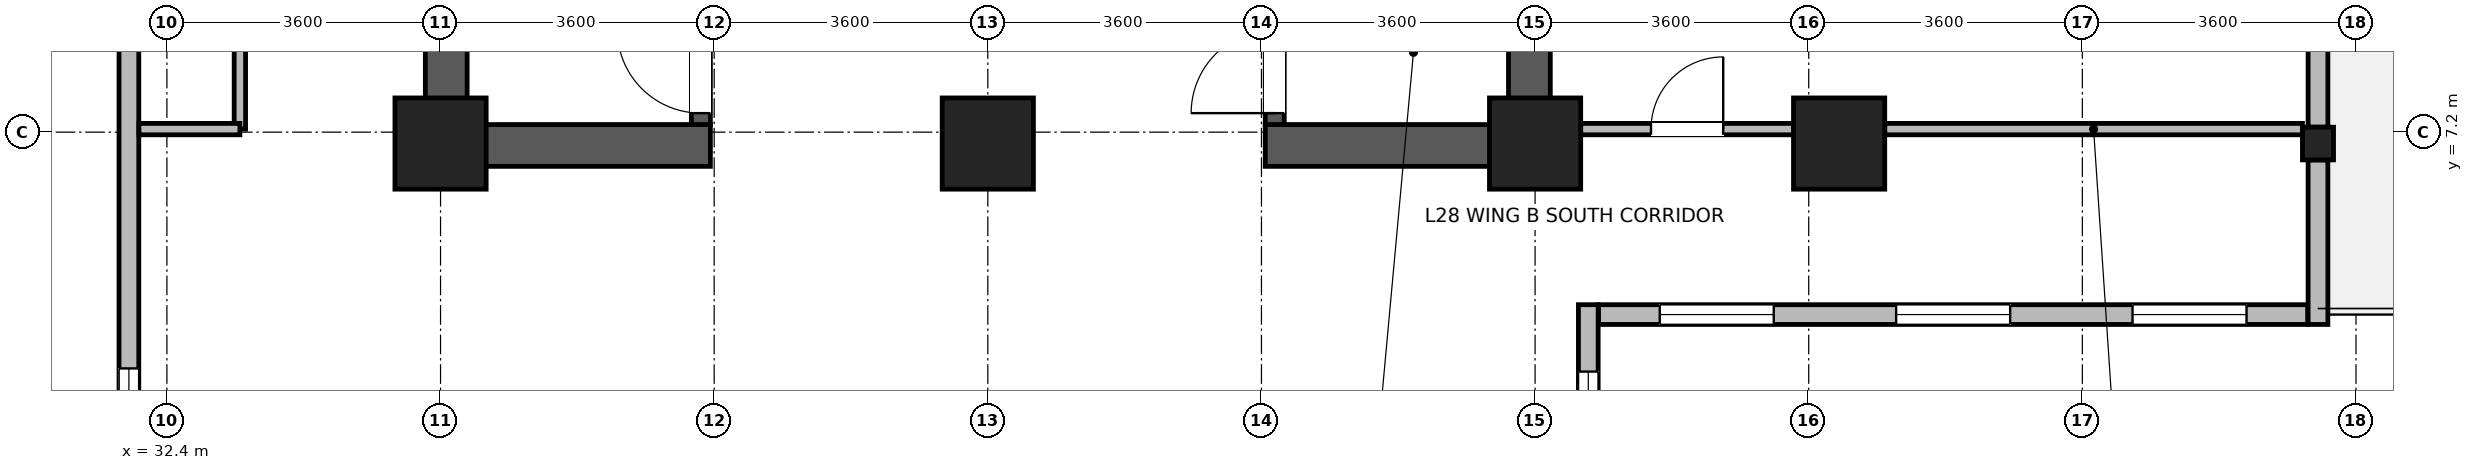
"""IFC4 building model, lengths in metres.
Left out: names, types, materials, properties, quantities, classifications, styles, units other than length and angle.
Written with IfcOpenShell. Run it as: python <this file> out.ifc"""

import sys

from ifc_helpers import new_model, si_unit, direction, frame, frame_2d, origin, origin_2d, place, context, subcontext, project, spatial, rectangle, i_section, extrude, source, transform, mapped, element, fill, save


model = new_model("IFC4")
c1 = context("Model", 3, precision=1e-05, world=origin(), true_north=direction((0.0, 1.0)))
c2 = subcontext(c1, "Body", "Model", "MODEL_VIEW")
j1 = project(units=[si_unit("LENGTHUNIT", "METRE"), si_unit("PLANEANGLEUNIT", "RADIAN")], contexts=[c1])
p1 = place(None, origin())
s1 = spatial("IfcSite", under=j1, at=p1, CompositionType="ELEMENT")
p2 = place(p1, origin())
s2 = spatial("IfcBuilding", under=s1, at=p2, CompositionType="ELEMENT")
p3 = place(p2, frame((0.0, 0.0, 111.9)))
s3 = spatial("IfcBuildingStorey", under=s2, at=p3, CompositionType="ELEMENT", Elevation=111.9)
for number, where, z_axis, x_axis in (
    (1, (36.075, 6.75, 0.0), (0.0, 0.0, 1.0), (0.0, 1.0, 0.0)),
    (2, (50.325, 6.75, 0.0), (0.0, 0.0, 1.0), (0.0, 1.0, 0.0)),
):
    element("IfcWall", number, at=place(p3, frame(where, z_axis=z_axis, x_axis=x_axis)), inside=s3, PredefinedType="SHEAR", context=c2, shape_type="SweptSolid", body=[
        extrude(rectangle(XDim=8.1, YDim=0.55, at=frame_2d((4.05, 0.0))), origin(), (0.0, 0.0, 1.0), 3.45),
    ])
for number, where, z_axis, x_axis in (
    (3, (36.35, 7.025, 0.0), (0.0, 0.0, 1.0), (1.0, 0.0, 0.0)),
    (4, (46.85, 7.025, 0.0), (0.0, 0.0, 1.0), (1.0, 0.0, 0.0)),
):
    element("IfcWall", number, at=place(p3, frame(where, z_axis=z_axis, x_axis=x_axis)), inside=s3, PredefinedType="SHEAR", context=c2, shape_type="SweptSolid", body=[
        extrude(rectangle(XDim=3.2, YDim=0.55, at=frame_2d((1.6, 0.0))), origin(), (0.0, 0.0, 1.0), 3.45),
    ])
p4 = place(p3, frame((39.425, 7.3, 0.0), z_axis=(0.0, 0.0, 1.0), x_axis=(0.0, 1.0, 0.0)))
e5 = element("IfcWall", 5, at=p4, inside=s3, PredefinedType="SHEAR", context=c2, shape_type="SweptSolid", body=[
    extrude(rectangle(XDim=7.0, YDim=0.25, at=frame_2d((3.5, 0.0))), origin(), (0.0, 0.0, 1.0), 3.45),
])
p5 = place(p4, frame((0.15, 0.0, 0.0)))
e6 = element("IfcOpeningElement", 6, at=p5, cuts=e5, PredefinedType="OPENING", context=c2, shape_type="SweptSolid", body=[
    extrude(rectangle(XDim=1.1, YDim=2.08, at=frame_2d((0.55, 1.04))), frame((0.0, 0.135, 0.0), z_axis=(0.0, -1.0, 0.0), x_axis=(1.0, 0.0, 0.0)), (0.0, 0.0, 1.0), 0.27),
])
p6 = place(p3, frame((46.975, 7.3, 0.0), z_axis=(0.0, 0.0, 1.0), x_axis=(0.0, 1.0, 0.0)))
e7 = element("IfcWall", 7, at=p6, inside=s3, PredefinedType="SHEAR", context=c2, shape_type="SweptSolid", body=[
    extrude(rectangle(XDim=7.0, YDim=0.25, at=frame_2d((3.5, 0.0))), origin(), (0.0, 0.0, 1.0), 3.45),
])
p7 = place(p6, frame((0.15, 0.0, 0.0)))
e8 = element("IfcOpeningElement", 8, at=p7, cuts=e7, PredefinedType="OPENING", context=c2, shape_type="SweptSolid", body=[
    extrude(rectangle(XDim=1.1, YDim=2.08, at=frame_2d((0.55, 1.04))), frame((0.0, 0.135, 0.0), z_axis=(0.0, -1.0, 0.0), x_axis=(1.0, 0.0, 0.0)), (0.0, 0.0, 1.0), 0.27),
])
m1 = source(origin(), c2, "Body", "SweptSolid", [
    extrude(rectangle(XDim=1.2, YDim=1.2, at=origin_2d()), origin(), (0.0, 0.0, 1.0), 3.7),
])
for number, where, z_axis, x_axis in (
    (9, (36.0, 7.05, 0.0), (0.0, 0.0, 1.0), (1.0, 0.0, 0.0)),
    (10, (43.2, 7.05, 0.0), (0.0, 0.0, 1.0), (1.0, 0.0, 0.0)),
    (11, (50.4, 7.05, 0.0), (0.0, 0.0, 1.0), (1.0, 0.0, 0.0)),
    (12, (54.4, 7.05, 0.0), (0.0, 0.0, 1.0), (1.0, 0.0, 0.0)),
):
    element("IfcColumn", number, at=place(p3, frame(where, z_axis=z_axis, x_axis=x_axis)), inside=s3, PredefinedType="COLUMN", context=c2, shape_type="MappedRepresentation", body=[
        mapped(m1, transform((0.0, 0.0, 0.0), x_axis=(1.0, 0.0, 0.0), y_axis=(0.0, 1.0, 0.0), z_axis=(0.0, 0.0, 1.0), scale=1.0)),
    ])
m2 = source(origin(), c2, "Body", "SweptSolid", [
    extrude(i_section(OverallWidth=0.409, OverallDepth=0.43, WebThickness=0.024, FlangeThickness=0.033, FilletRadius=0.015, at=origin_2d()), origin(), (0.0, 0.0, 1.0), 3.7),
])
p8 = place(p3, frame((60.7, 7.05, 0.0), z_axis=(0.0, 0.0, 1.0), x_axis=(1.0, 0.0, 0.0)))
e13 = element("IfcColumn", 13, at=p8, inside=s3, PredefinedType="COLUMN", context=c2, shape_type="MappedRepresentation", body=[
    mapped(m2, transform((0.0, 0.0, 0.0), x_axis=(1.0, 0.0, 0.0), y_axis=(0.0, 1.0, 0.0), z_axis=(0.0, 0.0, 1.0), scale=1.0)),
])
p9 = place(p3, frame((51.1, 4.93, 0.0), z_axis=(0.0, 0.0, 1.0), x_axis=(0.0, -1.0, 0.0)))
e14 = element("IfcWall", 14, at=p9, inside=s3, PredefinedType="STANDARD", context=c2, shape_type="SweptSolid", body=[
    extrude(rectangle(XDim=3.26, YDim=0.26, at=frame_2d((1.63, 0.0))), origin(), (0.0, 0.0, 1.0), 3.43),
])
p10 = place(p9, frame((0.88, 0.0, 0.85)))
e15 = element("IfcOpeningElement", 15, at=p10, cuts=e14, PredefinedType="OPENING", context=c2, shape_type="SweptSolid", body=[
    extrude(rectangle(XDim=1.5, YDim=1.85, at=frame_2d((0.75, 0.925))), frame((0.0, 0.14, 0.0), z_axis=(0.0, -1.0, 0.0), x_axis=(1.0, 0.0, 0.0)), (0.0, 0.0, 1.0), 0.28),
])
p11 = place(p3, frame((60.565, 4.8, 0.0), z_axis=(0.0, 0.0, 1.0), x_axis=(-1.0, 0.0, 0.0)))
e16 = element("IfcWall", 16, at=p11, inside=s3, PredefinedType="STANDARD", context=c2, shape_type="SweptSolid", body=[
    extrude(rectangle(XDim=9.33, YDim=0.26, at=frame_2d((4.665, 0.0))), origin(), (0.0, 0.0, 1.0), 3.43),
])
p12 = place(p11, frame((0.805, 0.0, 0.85)))
e17 = element("IfcOpeningElement", 17, at=p12, cuts=e16, PredefinedType="OPENING", context=c2, shape_type="SweptSolid", body=[
    extrude(rectangle(XDim=1.5, YDim=1.85, at=frame_2d((0.75, 0.925))), frame((0.0, 0.14, 0.0), z_axis=(0.0, -1.0, 0.0), x_axis=(1.0, 0.0, 0.0)), (0.0, 0.0, 1.0), 0.28),
])
p13 = place(p11, frame((3.915, 0.0, 0.85)))
e18 = element("IfcOpeningElement", 18, at=p13, cuts=e16, PredefinedType="OPENING", context=c2, shape_type="SweptSolid", body=[
    extrude(rectangle(XDim=1.5, YDim=1.85, at=frame_2d((0.75, 0.925))), frame((0.0, 0.14, 0.0), z_axis=(0.0, -1.0, 0.0), x_axis=(1.0, 0.0, 0.0)), (0.0, 0.0, 1.0), 0.28),
])
p14 = place(p11, frame((7.025, 0.0, 0.85)))
e19 = element("IfcOpeningElement", 19, at=p14, cuts=e16, PredefinedType="OPENING", context=c2, shape_type="SweptSolid", body=[
    extrude(rectangle(XDim=1.5, YDim=1.85, at=frame_2d((0.75, 0.925))), frame((0.0, 0.14, 0.0), z_axis=(0.0, -1.0, 0.0), x_axis=(1.0, 0.0, 0.0)), (0.0, 0.0, 1.0), 0.28),
])
p15 = place(p3, frame((60.7, 6.834, 0.0), z_axis=(0.0, 0.0, 1.0), x_axis=(0.0, -1.0, 0.0)))
e20 = element("IfcWall", 20, at=p15, inside=s3, PredefinedType="STANDARD", context=c2, shape_type="SweptSolid", body=[
    extrude(rectangle(XDim=2.164, YDim=0.26, at=frame_2d((1.082, 0.0))), origin(), (0.0, 0.0, 1.0), 3.43),
])
p16 = place(p3, frame((60.7, 14.334, 0.0), z_axis=(0.0, 0.0, 1.0), x_axis=(0.0, -1.0, 0.0)))
e21 = element("IfcWall", 21, at=p16, inside=s3, PredefinedType="STANDARD", context=c2, shape_type="SweptSolid", body=[
    extrude(rectangle(XDim=7.068, YDim=0.26, at=frame_2d((3.534, 0.0))), origin(), (0.0, 0.0, 1.0), 2.98),
])
p17 = place(p16, frame((2.784, 0.0, 0.0)))
e22 = element("IfcOpeningElement", 22, at=p17, cuts=e21, PredefinedType="OPENING", context=c2, shape_type="SweptSolid", body=[
    extrude(rectangle(XDim=1.5, YDim=2.15, at=frame_2d((0.75, 1.075))), frame((0.0, 0.14, 0.0), z_axis=(0.0, -1.0, 0.0), x_axis=(1.0, 0.0, 0.0)), (0.0, 0.0, 1.0), 0.28),
])
p18 = place(p16, frame((1.017, 0.0, 0.85)))
e23 = element("IfcOpeningElement", 23, at=p18, cuts=e21, PredefinedType="OPENING", context=c2, shape_type="SweptSolid", body=[
    extrude(rectangle(XDim=1.5, YDim=1.85, at=frame_2d((0.75, 0.925))), frame((0.0, 0.14, 0.0), z_axis=(0.0, -1.0, 0.0), x_axis=(1.0, 0.0, 0.0)), (0.0, 0.0, 1.0), 0.28),
])
p19 = place(p16, frame((4.551, 0.0, 0.85)))
e24 = element("IfcOpeningElement", 24, at=p19, cuts=e21, PredefinedType="OPENING", context=c2, shape_type="SweptSolid", body=[
    extrude(rectangle(XDim=1.5, YDim=1.85, at=frame_2d((0.75, 0.925))), frame((0.0, 0.14, 0.0), z_axis=(0.0, -1.0, 0.0), x_axis=(1.0, 0.0, 0.0)), (0.0, 0.0, 1.0), 0.28),
])
p20 = place(p3, frame((31.9, 1.67, 0.0), z_axis=(0.0, 0.0, 1.0), x_axis=(0.0, 1.0, 0.0)))
e25 = element("IfcWall", 25, at=p20, inside=s3, PredefinedType="STANDARD", context=c2, shape_type="SweptSolid", body=[
    extrude(rectangle(XDim=20.06, YDim=0.26, at=frame_2d((10.03, 0.0))), origin(), (0.0, 0.0, 1.0), 3.43),
])
p21 = place(p20, frame((0.922, 0.0, 0.85)))
e26 = element("IfcOpeningElement", 26, at=p21, cuts=e25, PredefinedType="OPENING", context=c2, shape_type="SweptSolid", body=[
    extrude(rectangle(XDim=1.5, YDim=1.85, at=frame_2d((0.75, 0.925))), frame((0.0, 0.14, 0.0), z_axis=(0.0, -1.0, 0.0), x_axis=(1.0, 0.0, 0.0)), (0.0, 0.0, 1.0), 0.28),
])
p22 = place(p20, frame((7.608, 0.0, 0.85)))
e27 = element("IfcOpeningElement", 27, at=p22, cuts=e25, PredefinedType="OPENING", context=c2, shape_type="SweptSolid", body=[
    extrude(rectangle(XDim=1.5, YDim=1.85, at=frame_2d((0.75, 0.925))), frame((0.0, 0.14, 0.0), z_axis=(0.0, -1.0, 0.0), x_axis=(1.0, 0.0, 0.0)), (0.0, 0.0, 1.0), 0.28),
])
p23 = place(p20, frame((10.952, 0.0, 0.85)))
e28 = element("IfcOpeningElement", 28, at=p23, cuts=e25, PredefinedType="OPENING", context=c2, shape_type="SweptSolid", body=[
    extrude(rectangle(XDim=1.5, YDim=1.85, at=frame_2d((0.75, 0.925))), frame((0.0, 0.14, 0.0), z_axis=(0.0, -1.0, 0.0), x_axis=(1.0, 0.0, 0.0)), (0.0, 0.0, 1.0), 0.28),
])
p24 = place(p20, frame((14.295, 0.0, 0.85)))
e29 = element("IfcOpeningElement", 29, at=p24, cuts=e25, PredefinedType="OPENING", context=c2, shape_type="SweptSolid", body=[
    extrude(rectangle(XDim=1.5, YDim=1.85, at=frame_2d((0.75, 0.925))), frame((0.0, 0.14, 0.0), z_axis=(0.0, -1.0, 0.0), x_axis=(1.0, 0.0, 0.0)), (0.0, 0.0, 1.0), 0.28),
])
p25 = place(p20, frame((17.638, 0.0, 0.85)))
e30 = element("IfcOpeningElement", 30, at=p25, cuts=e25, PredefinedType="OPENING", context=c2, shape_type="SweptSolid", body=[
    extrude(rectangle(XDim=1.5, YDim=1.85, at=frame_2d((0.75, 0.925))), frame((0.0, 0.14, 0.0), z_axis=(0.0, -1.0, 0.0), x_axis=(1.0, 0.0, 0.0)), (0.0, 0.0, 1.0), 0.28),
])
p26 = place(p3, frame((51.0, 7.24, 0.0), z_axis=(0.0, 0.0, 1.0), x_axis=(1.0, 0.0, 0.0)))
e31 = element("IfcWall", 31, at=p26, inside=s3, PredefinedType="PARTITIONING", context=c2, shape_type="SweptSolid", body=[
    extrude(rectangle(XDim=2.8, YDim=0.15, at=frame_2d((1.4, 0.0))), origin(), (0.0, 0.0, 1.0), 2.78),
])
p27 = place(p26, frame((0.925, 0.0, 0.0)))
e32 = element("IfcOpeningElement", 32, at=p27, cuts=e31, PredefinedType="OPENING", context=c2, shape_type="SweptSolid", body=[
    extrude(rectangle(XDim=0.95, YDim=2.1, at=frame_2d((0.475, 1.05))), frame((0.0, 0.085, 0.0), z_axis=(0.0, -1.0, 0.0), x_axis=(1.0, 0.0, 0.0)), (0.0, 0.0, 1.0), 0.17),
])
p28 = place(p3, frame((55.0, 7.24, 0.0), z_axis=(0.0, 0.0, 1.0), x_axis=(1.0, 0.0, 0.0)))
e33 = element("IfcWall", 33, at=p28, inside=s3, PredefinedType="PARTITIONING", context=c2, shape_type="SweptSolid", body=[
    extrude(rectangle(XDim=5.496, YDim=0.15, at=frame_2d((2.748, 0.0))), origin(), (0.0, 0.0, 1.0), 2.78),
])
p29 = place(p3, frame((33.36, 7.24, 0.0), z_axis=(0.0, 0.0, 1.0), x_axis=(0.0, 1.0, 0.0)))
e34 = element("IfcWall", 34, at=p29, inside=s3, PredefinedType="PARTITIONING", context=c2, shape_type="SweptSolid", body=[
    extrude(rectangle(XDim=7.26, YDim=0.15, at=frame_2d((3.63, 0.0))), origin(), (0.0, 0.0, 1.0), 3.43),
])
p30 = place(p29, frame((2.98, 0.0, 0.0)))
e35 = element("IfcOpeningElement", 35, at=p30, cuts=e34, PredefinedType="OPENING", context=c2, shape_type="SweptSolid", body=[
    extrude(rectangle(XDim=1.3, YDim=2.12, at=frame_2d((0.65, 1.06))), frame((0.0, 0.085, 0.0), z_axis=(0.0, -1.0, 0.0), x_axis=(1.0, 0.0, 0.0)), (0.0, 0.0, 1.0), 0.17),
])
p31 = place(p3, frame((32.032, 7.24, 0.0), z_axis=(0.0, 0.0, 1.0), x_axis=(1.0, 0.0, 0.0)))
e36 = element("IfcWall", 36, at=p31, inside=s3, PredefinedType="PARTITIONING", context=c2, shape_type="SweptSolid", body=[
    extrude(rectangle(XDim=1.328, YDim=0.15, at=frame_2d((0.664, 0.0))), origin(), (0.0, 0.0, 1.0), 3.43),
])
p32 = place(p10, origin())
e37 = element("IfcWindow", 37, at=p32, inside=s3, PartitioningType="SINGLE_PANEL", PredefinedType="WINDOW", context=c2, shape_type="SweptSolid", body=[
    extrude(rectangle(XDim=1.5, YDim=1.85, at=frame_2d((0.75, 0.925))), frame((0.0, 0.03, 0.0), z_axis=(0.0, -1.0, 0.0), x_axis=(1.0, 0.0, 0.0)), (0.0, 0.0, 1.0), 0.06),
])
fill(e15, e37)
p33 = place(p12, origin())
e38 = element("IfcWindow", 38, at=p33, inside=s3, PartitioningType="SINGLE_PANEL", PredefinedType="WINDOW", context=c2, shape_type="SweptSolid", body=[
    extrude(rectangle(XDim=1.5, YDim=1.85, at=frame_2d((0.75, 0.925))), frame((0.0, 0.03, 0.0), z_axis=(0.0, -1.0, 0.0), x_axis=(1.0, 0.0, 0.0)), (0.0, 0.0, 1.0), 0.06),
])
fill(e17, e38)
p34 = place(p13, origin())
e39 = element("IfcWindow", 39, at=p34, inside=s3, PartitioningType="SINGLE_PANEL", PredefinedType="WINDOW", context=c2, shape_type="SweptSolid", body=[
    extrude(rectangle(XDim=1.5, YDim=1.85, at=frame_2d((0.75, 0.925))), frame((0.0, 0.03, 0.0), z_axis=(0.0, -1.0, 0.0), x_axis=(1.0, 0.0, 0.0)), (0.0, 0.0, 1.0), 0.06),
])
fill(e18, e39)
p35 = place(p14, origin())
e40 = element("IfcWindow", 40, at=p35, inside=s3, PartitioningType="SINGLE_PANEL", PredefinedType="WINDOW", context=c2, shape_type="SweptSolid", body=[
    extrude(rectangle(XDim=1.5, YDim=1.85, at=frame_2d((0.75, 0.925))), frame((0.0, 0.03, 0.0), z_axis=(0.0, -1.0, 0.0), x_axis=(1.0, 0.0, 0.0)), (0.0, 0.0, 1.0), 0.06),
])
fill(e19, e40)
p36 = place(p21, origin())
e41 = element("IfcWindow", 41, at=p36, inside=s3, PartitioningType="SINGLE_PANEL", PredefinedType="WINDOW", context=c2, shape_type="SweptSolid", body=[
    extrude(rectangle(XDim=1.5, YDim=1.85, at=frame_2d((0.75, 0.925))), frame((0.0, 0.03, 0.0), z_axis=(0.0, -1.0, 0.0), x_axis=(1.0, 0.0, 0.0)), (0.0, 0.0, 1.0), 0.06),
])
fill(e26, e41)
p37 = place(p5, origin())
e42 = element("IfcDoor", 42, at=p37, inside=s3, OperationType="SINGLE_SWING_RIGHT", PredefinedType="DOOR", context=c2, shape_type="SweptSolid", body=[
    extrude(rectangle(XDim=1.1, YDim=2.08, at=frame_2d((0.55, 1.04))), frame((0.0, 0.025, 0.0), z_axis=(0.0, -1.0, 0.0), x_axis=(1.0, 0.0, 0.0)), (0.0, 0.0, 1.0), 0.05),
])
fill(e6, e42)
p38 = place(p7, origin())
e43 = element("IfcDoor", 43, at=p38, inside=s3, OperationType="SINGLE_SWING_LEFT", PredefinedType="DOOR", context=c2, shape_type="SweptSolid", body=[
    extrude(rectangle(XDim=1.1, YDim=2.08, at=frame_2d((0.55, 1.04))), frame((0.0, 0.025, 0.0), z_axis=(0.0, -1.0, 0.0), x_axis=(1.0, 0.0, 0.0)), (0.0, 0.0, 1.0), 0.05),
])
fill(e8, e43)
p39 = place(p27, origin())
e44 = element("IfcDoor", 44, at=p39, inside=s3, OperationType="SINGLE_SWING_RIGHT", PredefinedType="DOOR", context=c2, shape_type="SweptSolid", body=[
    extrude(rectangle(XDim=0.95, YDim=2.1, at=frame_2d((0.475, 1.05))), frame((0.0, 0.025, 0.0), z_axis=(0.0, -1.0, 0.0), x_axis=(1.0, 0.0, 0.0)), (0.0, 0.0, 1.0), 0.05),
])
fill(e32, e44)
save(model, sys.argv[1])
